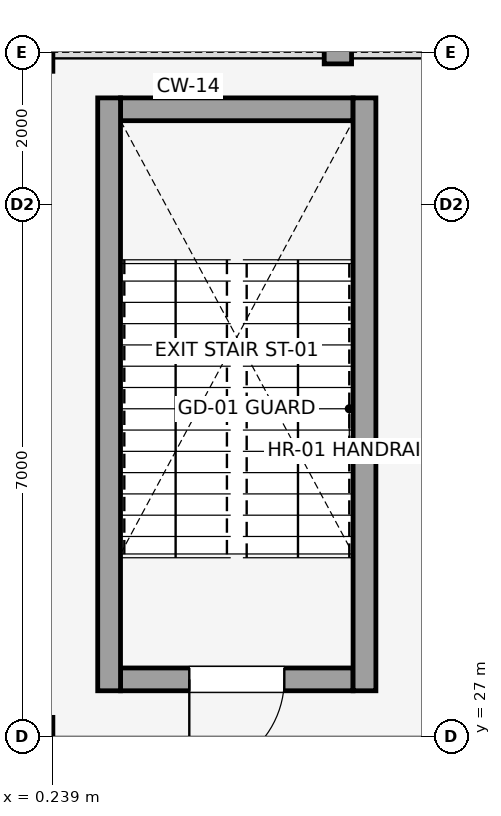
"""IFC4 building model, lengths in metres.
Left out: names, types, materials, properties, quantities, classifications, styles, units other than length and angle.
Written with IfcOpenShell. Run it as: python <this file> out.ifc"""

import sys

from ifc_helpers import new_model, si_unit, direction, frame, frame_2d, origin, origin_2d, place, context, subcontext, project, spatial, rectangle, extrude, element, fill, save


model = new_model("IFC4")
c1 = context("Model", 3, precision=1e-05, world=origin(), true_north=direction((0.0, 1.0)))
c2 = subcontext(c1, "Body", "Model", "MODEL_VIEW")
j1 = project(units=[si_unit("LENGTHUNIT", "METRE"), si_unit("PLANEANGLEUNIT", "RADIAN")], contexts=[c1])
p1 = place(None, origin())
s1 = spatial("IfcSite", under=j1, at=p1, CompositionType="ELEMENT")
p2 = place(p1, origin())
s2 = spatial("IfcBuilding", under=s1, at=p2, CompositionType="ELEMENT")
p3 = place(p2, frame((0.0, 0.0, 4.5)))
s3 = spatial("IfcBuildingStorey", under=s2, at=p3, CompositionType="ELEMENT", Elevation=4.5)
for number, where, z_axis, x_axis in (
    (1, (0.0, 27.0, 0.0), (0.0, 0.0, 1.0), (1.0, 0.0, 0.0)),
    (2, (0.0, 36.0, 0.0), (0.0, 0.0, 1.0), (1.0, 0.0, 0.0)),
):
    element("IfcColumn", number, at=place(p3, frame(where, z_axis=z_axis, x_axis=x_axis)), inside=s3, PredefinedType="COLUMN", context=c2, shape_type="SweptSolid", body=[
        extrude(rectangle(XDim=0.5, YDim=0.5, at=origin_2d()), origin(), (0.0, 0.0, 1.0), 4.5),
    ])
p4 = place(p3, frame((4.18, 36.0, 0.0), z_axis=(0.0, 0.0, 1.0), x_axis=(-1.0, 0.0, 0.0)))
e3 = element("IfcWall", 3, at=p4, inside=s3, PredefinedType="SOLIDWALL", context=c2, shape_type="SweptSolid", body=[
    extrude(rectangle(XDim=0.36, YDim=0.305, at=frame_2d((0.18, 0.0))), origin(), (0.0, 0.0, 1.0), 3.12),
])
p5 = place(p3, frame((4.2, 27.75, 0.0), z_axis=(0.0, 0.0, 1.0), x_axis=(-1.0, 0.0, 0.0)))
e4 = element("IfcWall", 4, at=p5, inside=s3, PredefinedType="SHEAR", context=c2, shape_type="SweptSolid", body=[
    extrude(rectangle(XDim=3.06, YDim=0.3, at=frame_2d((1.53, 0.0))), origin(), (0.0, 0.0, 1.0), 4.5),
])
p6 = place(p5, frame((0.905, 0.0, 0.0)))
e5 = element("IfcOpeningElement", 5, at=p6, cuts=e4, PredefinedType="OPENING", context=c2, shape_type="SweptSolid", body=[
    extrude(rectangle(XDim=1.25, YDim=2.15, at=frame_2d((0.625, 1.075))), frame((0.0, 0.16, 0.0), z_axis=(0.0, -1.0, 0.0), x_axis=(1.0, 0.0, 0.0)), (0.0, 0.0, 1.0), 0.32),
])
p7 = place(p3, frame((4.2, 35.25, 0.0), z_axis=(0.0, 0.0, 1.0), x_axis=(-1.0, 0.0, 0.0)))
e6 = element("IfcWall", 6, at=p7, inside=s3, PredefinedType="SHEAR", context=c2, shape_type="SweptSolid", body=[
    extrude(rectangle(XDim=3.06, YDim=0.3, at=frame_2d((1.53, 0.0))), origin(), (0.0, 0.0, 1.0), 4.5),
])
for number, where, z_axis, x_axis in (
    (7, (4.35, 27.6, 0.0), (0.0, 0.0, 1.0), (0.0, 1.0, 0.0)),
    (8, (0.99, 27.6, 0.0), (0.0, 0.0, 1.0), (0.0, 1.0, 0.0)),
):
    element("IfcWall", number, at=place(p3, frame(where, z_axis=z_axis, x_axis=x_axis)), inside=s3, PredefinedType="SHEAR", context=c2, shape_type="SweptSolid", body=[
        extrude(rectangle(XDim=7.8, YDim=0.3, at=frame_2d((3.9, 0.0))), origin(), (0.0, 0.0, 1.0), 4.5),
    ])
p8 = place(p6, origin())
e9 = element("IfcDoor", 9, at=p8, inside=s3, OperationType="SINGLE_SWING_RIGHT", PredefinedType="DOOR", context=c2, shape_type="SweptSolid", body=[
    extrude(rectangle(XDim=1.25, YDim=2.15, at=frame_2d((0.625, 1.075))), frame((0.0, 0.025, 0.0), z_axis=(0.0, -1.0, 0.0), x_axis=(1.0, 0.0, 0.0)), (0.0, 0.0, 1.0), 0.05),
])
fill(e5, e9)
save(model, sys.argv[1])
